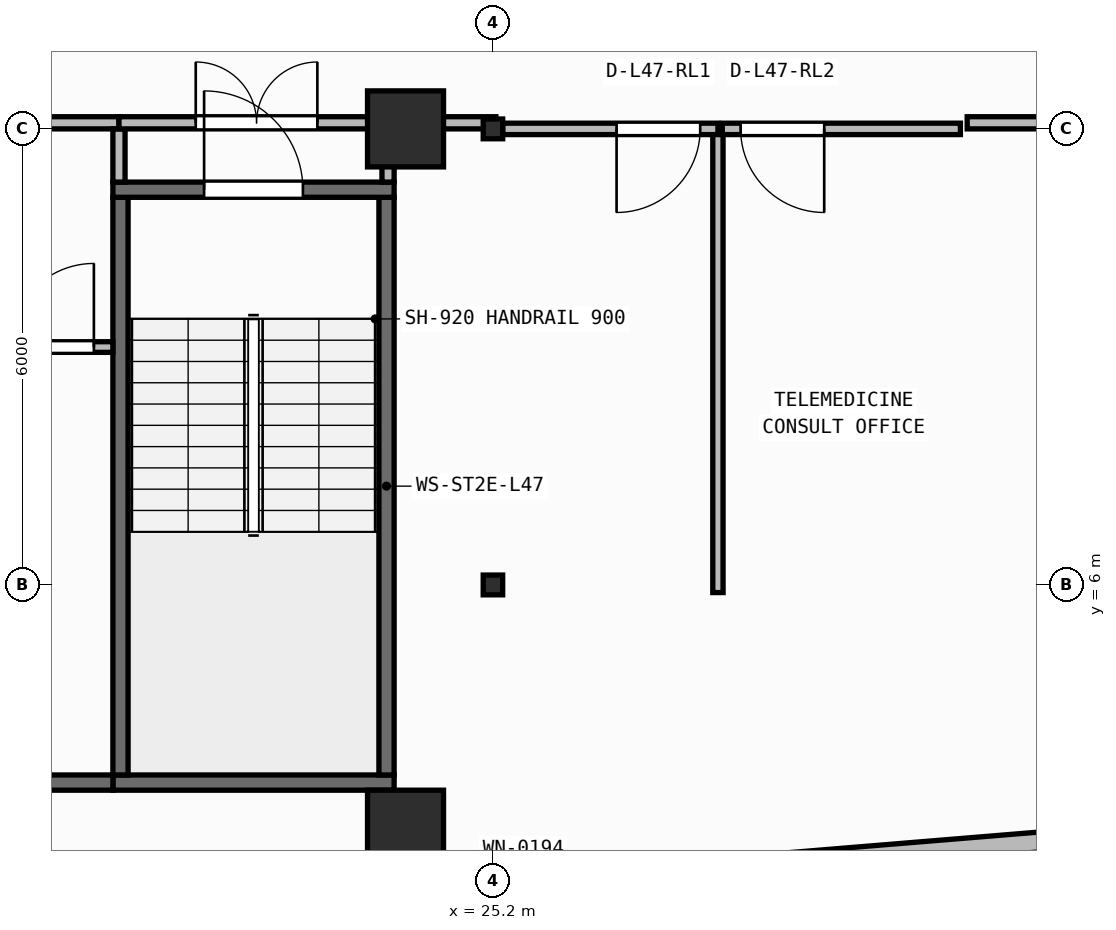
"""IFC4 building model, lengths in metres.
Left out: names, types, materials, properties, quantities, classifications, styles, units other than length and angle.
Written with IfcOpenShell. Run it as: python <this file> out.ifc"""

import sys

from ifc_helpers import new_model, si_unit, direction, frame, frame_2d, origin, origin_2d, place, context, subcontext, project, spatial, rectangle, i_section, extrude, element, fill, save


model = new_model("IFC4")
c1 = context("Model", 3, precision=1e-05, world=origin(), true_north=direction((0.0, 1.0)))
c2 = subcontext(c1, "Body", "Model", "MODEL_VIEW")
j1 = project(units=[si_unit("LENGTHUNIT", "METRE"), si_unit("PLANEANGLEUNIT", "RADIAN")], contexts=[c1])
p1 = place(None, origin())
s1 = spatial("IfcSite", under=j1, at=p1, CompositionType="ELEMENT")
p2 = place(p1, origin())
s2 = spatial("IfcBuilding", under=s1, at=p2, CompositionType="ELEMENT")
p3 = place(p2, frame((0.0, 0.0, 192.1)))
s3 = spatial("IfcBuildingStorey", under=s2, at=p3, CompositionType="ELEMENT", Elevation=192.1)
p4 = place(p3, frame((24.05, 2.8, 0.0), z_axis=(0.0, 0.0, 1.0), x_axis=(1.0, 0.0, 0.0)))
e1 = element("IfcColumn", 1, at=p4, inside=s3, PredefinedType="COLUMN", context=c2, shape_type="SweptSolid", body=[
    extrude(rectangle(XDim=1.0, YDim=1.0, at=origin_2d()), origin(), (0.0, 0.0, 1.0), 3.95),
])
p5 = place(p3, frame((25.2, 6.0, 0.0), z_axis=(0.0, 0.0, 1.0), x_axis=(1.0, 0.0, 0.0)))
e2 = element("IfcColumn", 2, at=p5, inside=s3, PredefinedType="COLUMN", context=c2, shape_type="SweptSolid", body=[
    extrude(i_section(OverallWidth=0.256, OverallDepth=0.26, WebThickness=0.01, FlangeThickness=0.017, FilletRadius=0.013, at=origin_2d()), origin(), (0.0, 0.0, 1.0), 3.95),
])
p6 = place(p3, frame((24.05, 12.0, 0.0), z_axis=(0.0, 0.0, 1.0), x_axis=(1.0, 0.0, 0.0)))
e3 = element("IfcColumn", 3, at=p6, inside=s3, PredefinedType="COLUMN", context=c2, shape_type="SweptSolid", body=[
    extrude(rectangle(XDim=1.0, YDim=1.0, at=origin_2d()), origin(), (0.0, 0.0, 1.0), 3.95),
])
p7 = place(p3, frame((25.2, 12.0, 0.0), z_axis=(0.0, 0.0, 1.0), x_axis=(1.0, 0.0, 0.0)))
e4 = element("IfcColumn", 4, at=p7, inside=s3, PredefinedType="COLUMN", context=c2, shape_type="SweptSolid", body=[
    extrude(i_section(OverallWidth=0.256, OverallDepth=0.26, WebThickness=0.01, FlangeThickness=0.017, FilletRadius=0.013, at=origin_2d()), origin(), (0.0, 0.0, 1.0), 3.95),
])
p8 = place(p3, frame((2.66, 0.174, 0.0), z_axis=(0.0, 0.0, 1.0), x_axis=(0.996634028439, 0.081979347142, 0.0)))
e5 = element("IfcWall", 5, at=p8, inside=s3, PredefinedType="STANDARD", context=c2, shape_type="SweptSolid", body=[
    extrude(rectangle(XDim=46.035, YDim=0.26, at=frame_2d((23.018, 0.0))), origin(), (0.0, 0.0, 1.0), 3.71),
])
p9 = place(p8, frame((21.817, 0.0, 0.9)))
e6 = element("IfcOpeningElement", 6, at=p9, cuts=e5, PredefinedType="OPENING", context=c2, shape_type="SweptSolid", body=[
    extrude(rectangle(XDim=2.4, YDim=1.65, at=frame_2d((1.2, 0.825))), frame((0.0, 0.14, 0.0), z_axis=(0.0, -1.0, 0.0), x_axis=(1.0, 0.0, 0.0)), (0.0, 0.0, 1.0), 0.28),
])
p10 = place(p3, frame((20.2, 3.4, 0.0), z_axis=(0.0, 0.0, 1.0), x_axis=(1.0, 0.0, 0.0)))
e7 = element("IfcWall", 7, at=p10, inside=s3, PredefinedType="SHEAR", context=c2, shape_type="SweptSolid", body=[
    extrude(rectangle(XDim=3.7, YDim=0.2, at=frame_2d((1.85, 0.0))), origin(), (0.0, 0.0, 1.0), 3.71),
])
for number, where, z_axis, x_axis in (
    (8, (20.3, 3.5, 0.0), (0.0, 0.0, 1.0), (0.0, 1.0, 0.0)),
    (9, (23.8, 3.5, 0.0), (0.0, 0.0, 1.0), (0.0, 1.0, 0.0)),
):
    element("IfcWall", number, at=place(p3, frame(where, z_axis=z_axis, x_axis=x_axis)), inside=s3, PredefinedType="SHEAR", context=c2, shape_type="SweptSolid", body=[
        extrude(rectangle(XDim=7.6, YDim=0.2, at=frame_2d((3.8, 0.0))), origin(), (0.0, 0.0, 1.0), 3.71),
    ])
p11 = place(p3, frame((20.2, 11.2, 0.0), z_axis=(0.0, 0.0, 1.0), x_axis=(1.0, 0.0, 0.0)))
e10 = element("IfcWall", 10, at=p11, inside=s3, PredefinedType="SHEAR", context=c2, shape_type="SweptSolid", body=[
    extrude(rectangle(XDim=3.7, YDim=0.2, at=frame_2d((1.85, 0.0))), origin(), (0.0, 0.0, 1.0), 3.71),
])
p12 = place(p11, frame((1.2, 0.0, 0.0)))
e11 = element("IfcOpeningElement", 11, at=p12, cuts=e10, PredefinedType="OPENING", context=c2, shape_type="SweptSolid", body=[
    extrude(rectangle(XDim=1.3, YDim=2.15, at=frame_2d((0.65, 1.075))), frame((0.0, 0.11, 0.0), z_axis=(0.0, -1.0, 0.0), x_axis=(1.0, 0.0, 0.0)), (0.0, 0.0, 1.0), 0.22),
])
p13 = place(p3, frame((6.5, 3.4, 0.0), z_axis=(0.0, 0.0, 1.0), x_axis=(1.0, 0.0, 0.0)))
e12 = element("IfcWall", 12, at=p13, inside=s3, PredefinedType="SHEAR", context=c2, shape_type="SweptSolid", body=[
    extrude(rectangle(XDim=13.7, YDim=0.2, at=frame_2d((6.85, 0.0))), origin(), (0.0, 0.0, 1.0), 3.71),
])
p14 = place(p3, frame((18.61, 9.13, 0.0), z_axis=(0.0, 0.0, 1.0), x_axis=(1.0, 0.0, 0.0)))
e13 = element("IfcWall", 13, at=p14, inside=s3, PredefinedType="PARTITIONING", context=c2, shape_type="SweptSolid", body=[
    extrude(rectangle(XDim=1.59, YDim=0.14, at=frame_2d((0.795, 0.0))), origin(), (0.0, 0.0, 1.0), 3.71),
])
p15 = place(p14, frame((0.24, 0.0, 0.0)))
e14 = element("IfcOpeningElement", 14, at=p15, cuts=e13, PredefinedType="OPENING", context=c2, shape_type="SweptSolid", body=[
    extrude(rectangle(XDim=1.1, YDim=2.1, at=frame_2d((0.55, 1.05))), frame((0.0, 0.08, 0.0), z_axis=(0.0, -1.0, 0.0), x_axis=(1.0, 0.0, 0.0)), (0.0, 0.0, 1.0), 0.16),
])
p16 = place(p3, frame((12.58, 12.08, 0.0), z_axis=(0.0, 0.0, 1.0), x_axis=(1.0, 0.0, 0.0)))
e15 = element("IfcWall", 15, at=p16, inside=s3, PredefinedType="PARTITIONING", context=c2, shape_type="SweptSolid", body=[
    extrude(rectangle(XDim=7.7, YDim=0.16, at=frame_2d((3.85, 0.0))), origin(), (0.0, 0.0, 1.0), 3.152),
])
p17 = place(p16, frame((3.05, 0.0, 0.0)))
e16 = element("IfcOpeningElement", 16, at=p17, cuts=e15, PredefinedType="OPENING", context=c2, shape_type="SweptSolid", body=[
    extrude(rectangle(XDim=1.6, YDim=2.05, at=frame_2d((0.8, 1.025))), frame((0.0, 0.09, 0.0), z_axis=(0.0, -1.0, 0.0), x_axis=(1.0, 0.0, 0.0)), (0.0, 0.0, 1.0), 0.18),
])
p18 = place(p3, frame((20.28, 11.3, 0.0), z_axis=(0.0, 0.0, 1.0), x_axis=(0.0, 1.0, 0.0)))
e17 = element("IfcWall", 17, at=p18, inside=s3, PredefinedType="PARTITIONING", context=c2, shape_type="SweptSolid", body=[
    extrude(rectangle(XDim=0.7, YDim=0.16, at=frame_2d((0.35, 0.0))), origin(), (0.0, 0.0, 1.0), 3.71),
])
p19 = place(p3, frame((20.28, 12.08, 0.0), z_axis=(0.0, 0.0, 1.0), x_axis=(1.0, 0.0, 0.0)))
e18 = element("IfcWall", 18, at=p19, inside=s3, PredefinedType="PARTITIONING", context=c2, shape_type="SweptSolid", body=[
    extrude(rectangle(XDim=3.62, YDim=0.16, at=frame_2d((1.81, 0.0))), origin(), (0.0, 0.0, 1.0), 3.152),
])
p20 = place(p19, frame((1.01, 0.0, 0.0)))
e19 = element("IfcOpeningElement", 19, at=p20, cuts=e18, PredefinedType="OPENING", context=c2, shape_type="SweptSolid", body=[
    extrude(rectangle(XDim=1.6, YDim=2.05, at=frame_2d((0.8, 1.025))), frame((0.0, 0.09, 0.0), z_axis=(0.0, -1.0, 0.0), x_axis=(1.0, 0.0, 0.0)), (0.0, 0.0, 1.0), 0.18),
])
p21 = place(p3, frame((23.82, 11.3, 0.0), z_axis=(0.0, 0.0, 1.0), x_axis=(0.0, 1.0, 0.0)))
e20 = element("IfcWall", 20, at=p21, inside=s3, PredefinedType="PARTITIONING", context=c2, shape_type="SweptSolid", body=[
    extrude(rectangle(XDim=0.7, YDim=0.16, at=frame_2d((0.35, 0.0))), origin(), (0.0, 0.0, 1.0), 3.71),
])
p22 = place(p3, frame((28.16, 5.9, 0.0), z_axis=(0.0, 0.0, 1.0), x_axis=(0.0, 1.0, 0.0)))
e21 = element("IfcWall", 21, at=p22, inside=s3, PredefinedType="PARTITIONING", context=c2, shape_type="SweptSolid", body=[
    extrude(rectangle(XDim=6.1, YDim=0.135, at=frame_2d((3.05, 0.0))), origin(), (0.0, 0.0, 1.0), 3.71),
])
p23 = place(p3, frame((28.16, 12.0, 0.0), z_axis=(0.0, 0.0, 1.0), x_axis=(-1.0, 0.0, 0.0)))
e22 = element("IfcWall", 22, at=p23, inside=s3, PredefinedType="PARTITIONING", context=c2, shape_type="SweptSolid", body=[
    extrude(rectangle(XDim=2.832, YDim=0.15, at=frame_2d((1.416, 0.0))), origin(), (0.0, 0.0, 1.0), 3.152),
])
p24 = place(p23, frame((0.233, 0.0, 0.0)))
e23 = element("IfcOpeningElement", 23, at=p24, cuts=e22, PredefinedType="OPENING", context=c2, shape_type="SweptSolid", body=[
    extrude(rectangle(XDim=1.1, YDim=2.1, at=frame_2d((0.55, 1.05))), frame((0.0, 0.085, 0.0), z_axis=(0.0, -1.0, 0.0), x_axis=(1.0, 0.0, 0.0)), (0.0, 0.0, 1.0), 0.17),
])
p25 = place(p3, frame((31.35, 12.0, 0.0), z_axis=(0.0, 0.0, 1.0), x_axis=(-1.0, 0.0, 0.0)))
e24 = element("IfcWall", 24, at=p25, inside=s3, PredefinedType="PARTITIONING", context=c2, shape_type="SweptSolid", body=[
    extrude(rectangle(XDim=3.133, YDim=0.15, at=frame_2d((1.566, 0.0))), origin(), (0.0, 0.0, 1.0), 3.152),
])
p26 = place(p25, frame((1.792, 0.0, 0.0)))
e25 = element("IfcOpeningElement", 25, at=p26, cuts=e24, PredefinedType="OPENING", context=c2, shape_type="SweptSolid", body=[
    extrude(rectangle(XDim=1.1, YDim=2.1, at=frame_2d((0.55, 1.05))), frame((0.0, 0.085, 0.0), z_axis=(0.0, -1.0, 0.0), x_axis=(1.0, 0.0, 0.0)), (0.0, 0.0, 1.0), 0.17),
])
p27 = place(p3, frame((24.02, 12.08, 0.0), z_axis=(0.0, 0.0, 1.0), x_axis=(1.0, 0.0, 0.0)))
e26 = element("IfcWall", 26, at=p27, inside=s3, PredefinedType="PARTITIONING", context=c2, shape_type="SweptSolid", body=[
    extrude(rectangle(XDim=1.219, YDim=0.16, at=frame_2d((0.609, 0.0))), origin(), (0.0, 0.0, 1.0), 3.152),
])
p28 = place(p3, frame((31.439, 12.08, 0.0), z_axis=(0.0, 0.0, 1.0), x_axis=(1.0, 0.0, 0.0)))
e27 = element("IfcWall", 27, at=p28, inside=s3, PredefinedType="PARTITIONING", context=c2, shape_type="SweptSolid", body=[
    extrude(rectangle(XDim=2.199, YDim=0.16, at=frame_2d((1.1, 0.0))), origin(), (0.0, 0.0, 1.0), 3.152),
])
p29 = place(p12, origin())
e28 = element("IfcDoor", 28, at=p29, inside=s3, OperationType="SINGLE_SWING_LEFT", PredefinedType="DOOR", context=c2, shape_type="SweptSolid", body=[
    extrude(rectangle(XDim=1.3, YDim=2.15, at=frame_2d((0.65, 1.075))), frame((0.0, 0.025, 0.0), z_axis=(0.0, -1.0, 0.0), x_axis=(1.0, 0.0, 0.0)), (0.0, 0.0, 1.0), 0.05),
])
fill(e11, e28)
p30 = place(p15, origin())
e29 = element("IfcDoor", 29, at=p30, inside=s3, OperationType="SINGLE_SWING_RIGHT", PredefinedType="DOOR", context=c2, shape_type="SweptSolid", body=[
    extrude(rectangle(XDim=1.1, YDim=2.1, at=frame_2d((0.55, 1.05))), frame((0.0, 0.025, 0.0), z_axis=(0.0, -1.0, 0.0), x_axis=(1.0, 0.0, 0.0)), (0.0, 0.0, 1.0), 0.05),
])
fill(e14, e29)
p31 = place(p20, origin())
e30 = element("IfcDoor", 30, at=p31, inside=s3, OperationType="DOUBLE_DOOR_SINGLE_SWING", PredefinedType="DOOR", context=c2, shape_type="SweptSolid", body=[
    extrude(rectangle(XDim=1.6, YDim=2.05, at=frame_2d((0.8, 1.025))), frame((0.0, 0.025, 0.0), z_axis=(0.0, -1.0, 0.0), x_axis=(1.0, 0.0, 0.0)), (0.0, 0.0, 1.0), 0.05),
])
fill(e19, e30)
p32 = place(p24, origin())
e31 = element("IfcDoor", 31, at=p32, inside=s3, OperationType="SINGLE_SWING_RIGHT", PredefinedType="DOOR", context=c2, shape_type="SweptSolid", body=[
    extrude(rectangle(XDim=1.1, YDim=2.1, at=frame_2d((0.55, 1.05))), frame((0.0, 0.025, 0.0), z_axis=(0.0, -1.0, 0.0), x_axis=(1.0, 0.0, 0.0)), (0.0, 0.0, 1.0), 0.05),
])
fill(e23, e31)
p33 = place(p26, origin())
e32 = element("IfcDoor", 32, at=p33, inside=s3, OperationType="SINGLE_SWING_LEFT", PredefinedType="DOOR", context=c2, shape_type="SweptSolid", body=[
    extrude(rectangle(XDim=1.1, YDim=2.1, at=frame_2d((0.55, 1.05))), frame((0.0, 0.025, 0.0), z_axis=(0.0, -1.0, 0.0), x_axis=(1.0, 0.0, 0.0)), (0.0, 0.0, 1.0), 0.05),
])
fill(e25, e32)
save(model, sys.argv[1])
